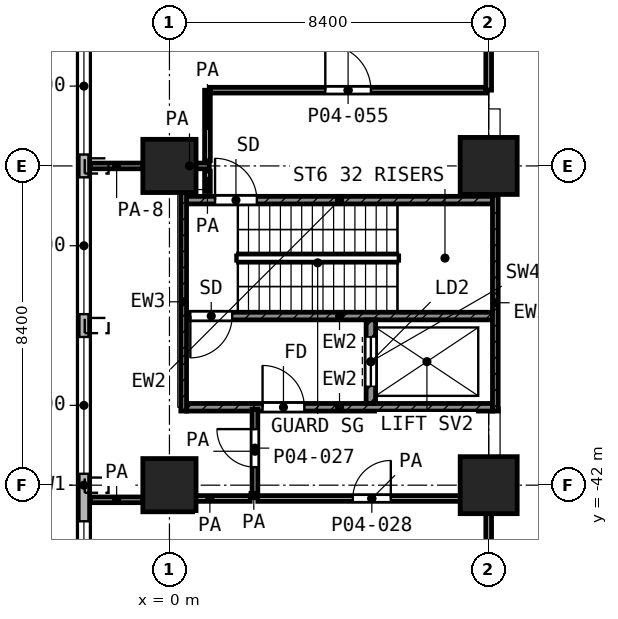
"""IFC4 building model, lengths in metres.
Left out: names, types, materials, properties, quantities, classifications, styles, units other than length and angle.
Written with IfcOpenShell. Run it as: python <this file> out.ifc"""

import sys

from ifc_helpers import new_model, si_unit, direction, frame, frame_2d, origin, origin_2d, place, context, subcontext, project, spatial, rectangle, extrude, element, fill, save


model = new_model("IFC4")
c1 = context("Model", 3, precision=1e-05, world=origin(), true_north=direction((0.0, 1.0)))
c2 = subcontext(c1, "Body", "Model", "MODEL_VIEW")
j1 = project(units=[si_unit("LENGTHUNIT", "METRE"), si_unit("PLANEANGLEUNIT", "RADIAN")], contexts=[c1])
p1 = place(None, origin())
s1 = spatial("IfcSite", under=j1, at=p1, CompositionType="ELEMENT")
p2 = place(p1, origin())
s2 = spatial("IfcBuilding", under=s1, at=p2, CompositionType="ELEMENT")
p3 = place(p2, frame((0.0, 0.0, 18.2)))
s3 = spatial("IfcBuildingStorey", under=s2, at=p3, CompositionType="ELEMENT", Elevation=18.2)
p4 = place(p3, frame((0.0, -33.6, 0.0), z_axis=(0.0, 0.0, 1.0), x_axis=(1.0, 0.0, 0.0)))
e1 = element("IfcColumn", 1, at=p4, inside=s3, PredefinedType="COLUMN", context=c2, shape_type="SweptSolid", body=[
    extrude(rectangle(XDim=1.4, YDim=1.4, at=origin_2d()), origin(), (0.0, 0.0, 1.0), 5.6),
])
p5 = place(p3, frame((8.4, -33.6, 0.0), z_axis=(0.0, 0.0, 1.0), x_axis=(1.0, 0.0, 0.0)))
e2 = element("IfcColumn", 2, at=p5, inside=s3, PredefinedType="COLUMN", context=c2, shape_type="SweptSolid", body=[
    extrude(rectangle(XDim=1.5, YDim=1.5, at=origin_2d()), origin(), (0.0, 0.0, 1.0), 5.6),
])
p6 = place(p3, frame((0.0, -42.0, 0.0), z_axis=(0.0, 0.0, 1.0), x_axis=(1.0, 0.0, 0.0)))
e3 = element("IfcColumn", 3, at=p6, inside=s3, PredefinedType="COLUMN", context=c2, shape_type="SweptSolid", body=[
    extrude(rectangle(XDim=1.4, YDim=1.4, at=origin_2d()), origin(), (0.0, 0.0, 1.0), 5.6),
])
p7 = place(p3, frame((8.4, -42.0, 0.0), z_axis=(0.0, 0.0, 1.0), x_axis=(1.0, 0.0, 0.0)))
e4 = element("IfcColumn", 4, at=p7, inside=s3, PredefinedType="COLUMN", context=c2, shape_type="SweptSolid", body=[
    extrude(rectangle(XDim=1.5, YDim=1.5, at=origin_2d()), origin(), (0.0, 0.0, 1.0), 5.6),
])
p8 = place(p3, frame((-2.25, -3.662, 0.0), z_axis=(0.0, 0.0, 1.0), x_axis=(0.0, -1.0, 0.0)))
e5 = element("IfcWall", 5, at=p8, inside=s3, PredefinedType="SOLIDWALL", context=c2, shape_type="SweptSolid", body=[
    extrude(rectangle(XDim=76.676, YDim=0.3, at=frame_2d((38.338, 0.0))), origin(), (0.0, 0.0, 1.0), 5.05),
])
p9 = place(p8, frame((0.838, 0.0, 0.9)))
e6 = element("IfcOpeningElement", 6, at=p9, cuts=e5, PredefinedType="OPENING", context=c2, shape_type="SweptSolid", body=[
    extrude(rectangle(XDim=3.6, YDim=3.0, at=frame_2d((1.8, 1.5))), frame((0.0, 0.16, 0.0), z_axis=(0.0, -1.0, 0.0), x_axis=(1.0, 0.0, 0.0)), (0.0, 0.0, 1.0), 0.32),
])
p10 = place(p8, frame((5.038, 0.0, 0.9)))
e7 = element("IfcOpeningElement", 7, at=p10, cuts=e5, PredefinedType="OPENING", context=c2, shape_type="SweptSolid", body=[
    extrude(rectangle(XDim=3.6, YDim=3.0, at=frame_2d((1.8, 1.5))), frame((0.0, 0.16, 0.0), z_axis=(0.0, -1.0, 0.0), x_axis=(1.0, 0.0, 0.0)), (0.0, 0.0, 1.0), 0.32),
])
p11 = place(p8, frame((9.238, 0.0, 0.9)))
e8 = element("IfcOpeningElement", 8, at=p11, cuts=e5, PredefinedType="OPENING", context=c2, shape_type="SweptSolid", body=[
    extrude(rectangle(XDim=3.6, YDim=3.0, at=frame_2d((1.8, 1.5))), frame((0.0, 0.16, 0.0), z_axis=(0.0, -1.0, 0.0), x_axis=(1.0, 0.0, 0.0)), (0.0, 0.0, 1.0), 0.32),
])
p12 = place(p8, frame((13.438, 0.0, 0.9)))
e9 = element("IfcOpeningElement", 9, at=p12, cuts=e5, PredefinedType="OPENING", context=c2, shape_type="SweptSolid", body=[
    extrude(rectangle(XDim=3.6, YDim=3.0, at=frame_2d((1.8, 1.5))), frame((0.0, 0.16, 0.0), z_axis=(0.0, -1.0, 0.0), x_axis=(1.0, 0.0, 0.0)), (0.0, 0.0, 1.0), 0.32),
])
p13 = place(p8, frame((17.638, 0.0, 0.9)))
e10 = element("IfcOpeningElement", 10, at=p13, cuts=e5, PredefinedType="OPENING", context=c2, shape_type="SweptSolid", body=[
    extrude(rectangle(XDim=3.6, YDim=3.0, at=frame_2d((1.8, 1.5))), frame((0.0, 0.16, 0.0), z_axis=(0.0, -1.0, 0.0), x_axis=(1.0, 0.0, 0.0)), (0.0, 0.0, 1.0), 0.32),
])
p14 = place(p8, frame((21.838, 0.0, 0.9)))
e11 = element("IfcOpeningElement", 11, at=p14, cuts=e5, PredefinedType="OPENING", context=c2, shape_type="SweptSolid", body=[
    extrude(rectangle(XDim=3.6, YDim=3.0, at=frame_2d((1.8, 1.5))), frame((0.0, 0.16, 0.0), z_axis=(0.0, -1.0, 0.0), x_axis=(1.0, 0.0, 0.0)), (0.0, 0.0, 1.0), 0.32),
])
p15 = place(p8, frame((26.038, 0.0, 0.9)))
e12 = element("IfcOpeningElement", 12, at=p15, cuts=e5, PredefinedType="OPENING", context=c2, shape_type="SweptSolid", body=[
    extrude(rectangle(XDim=3.6, YDim=3.0, at=frame_2d((1.8, 1.5))), frame((0.0, 0.16, 0.0), z_axis=(0.0, -1.0, 0.0), x_axis=(1.0, 0.0, 0.0)), (0.0, 0.0, 1.0), 0.32),
])
p16 = place(p8, frame((30.238, 0.0, 0.9)))
e13 = element("IfcOpeningElement", 13, at=p16, cuts=e5, PredefinedType="OPENING", context=c2, shape_type="SweptSolid", body=[
    extrude(rectangle(XDim=3.6, YDim=3.0, at=frame_2d((1.8, 1.5))), frame((0.0, 0.16, 0.0), z_axis=(0.0, -1.0, 0.0), x_axis=(1.0, 0.0, 0.0)), (0.0, 0.0, 1.0), 0.32),
])
p17 = place(p8, frame((34.438, 0.0, 0.9)))
e14 = element("IfcOpeningElement", 14, at=p17, cuts=e5, PredefinedType="OPENING", context=c2, shape_type="SweptSolid", body=[
    extrude(rectangle(XDim=3.6, YDim=3.0, at=frame_2d((1.8, 1.5))), frame((0.0, 0.16, 0.0), z_axis=(0.0, -1.0, 0.0), x_axis=(1.0, 0.0, 0.0)), (0.0, 0.0, 1.0), 0.32),
])
p18 = place(p8, frame((39.288, 0.0, 0.9)))
e15 = element("IfcOpeningElement", 15, at=p18, cuts=e5, PredefinedType="OPENING", context=c2, shape_type="SweptSolid", body=[
    extrude(rectangle(XDim=2.4, YDim=3.0, at=frame_2d((1.2, 1.5))), frame((0.0, 0.16, 0.0), z_axis=(0.0, -1.0, 0.0), x_axis=(1.0, 0.0, 0.0)), (0.0, 0.0, 1.0), 0.32),
])
p19 = place(p8, frame((42.838, 0.0, 0.9)))
e16 = element("IfcOpeningElement", 16, at=p19, cuts=e5, PredefinedType="OPENING", context=c2, shape_type="SweptSolid", body=[
    extrude(rectangle(XDim=3.6, YDim=3.0, at=frame_2d((1.8, 1.5))), frame((0.0, 0.16, 0.0), z_axis=(0.0, -1.0, 0.0), x_axis=(1.0, 0.0, 0.0)), (0.0, 0.0, 1.0), 0.32),
])
p20 = place(p8, frame((47.038, 0.0, 0.9)))
e17 = element("IfcOpeningElement", 17, at=p20, cuts=e5, PredefinedType="OPENING", context=c2, shape_type="SweptSolid", body=[
    extrude(rectangle(XDim=3.6, YDim=3.0, at=frame_2d((1.8, 1.5))), frame((0.0, 0.16, 0.0), z_axis=(0.0, -1.0, 0.0), x_axis=(1.0, 0.0, 0.0)), (0.0, 0.0, 1.0), 0.32),
])
p21 = place(p8, frame((51.238, 0.0, 0.9)))
e18 = element("IfcOpeningElement", 18, at=p21, cuts=e5, PredefinedType="OPENING", context=c2, shape_type="SweptSolid", body=[
    extrude(rectangle(XDim=3.6, YDim=3.0, at=frame_2d((1.8, 1.5))), frame((0.0, 0.16, 0.0), z_axis=(0.0, -1.0, 0.0), x_axis=(1.0, 0.0, 0.0)), (0.0, 0.0, 1.0), 0.32),
])
p22 = place(p8, frame((55.803, 0.0, 0.9)))
e19 = element("IfcOpeningElement", 19, at=p22, cuts=e5, PredefinedType="OPENING", context=c2, shape_type="SweptSolid", body=[
    extrude(rectangle(XDim=2.4, YDim=3.0, at=frame_2d((1.2, 1.5))), frame((0.0, 0.16, 0.0), z_axis=(0.0, -1.0, 0.0), x_axis=(1.0, 0.0, 0.0)), (0.0, 0.0, 1.0), 0.32),
])
p23 = place(p8, frame((59.638, 0.0, 0.9)))
e20 = element("IfcOpeningElement", 20, at=p23, cuts=e5, PredefinedType="OPENING", context=c2, shape_type="SweptSolid", body=[
    extrude(rectangle(XDim=3.6, YDim=3.0, at=frame_2d((1.8, 1.5))), frame((0.0, 0.16, 0.0), z_axis=(0.0, -1.0, 0.0), x_axis=(1.0, 0.0, 0.0)), (0.0, 0.0, 1.0), 0.32),
])
p24 = place(p8, frame((63.838, 0.0, 0.9)))
e21 = element("IfcOpeningElement", 21, at=p24, cuts=e5, PredefinedType="OPENING", context=c2, shape_type="SweptSolid", body=[
    extrude(rectangle(XDim=3.6, YDim=3.0, at=frame_2d((1.8, 1.5))), frame((0.0, 0.16, 0.0), z_axis=(0.0, -1.0, 0.0), x_axis=(1.0, 0.0, 0.0)), (0.0, 0.0, 1.0), 0.32),
])
p25 = place(p8, frame((68.438, 0.0, 0.9)))
e22 = element("IfcOpeningElement", 22, at=p25, cuts=e5, PredefinedType="OPENING", context=c2, shape_type="SweptSolid", body=[
    extrude(rectangle(XDim=1.2, YDim=3.0, at=frame_2d((0.6, 1.5))), frame((0.0, 0.16, 0.0), z_axis=(0.0, -1.0, 0.0), x_axis=(1.0, 0.0, 0.0)), (0.0, 0.0, 1.0), 0.32),
])
p26 = place(p8, frame((72.238, 0.0, 0.9)))
e23 = element("IfcOpeningElement", 23, at=p26, cuts=e5, PredefinedType="OPENING", context=c2, shape_type="SweptSolid", body=[
    extrude(rectangle(XDim=3.6, YDim=3.0, at=frame_2d((1.8, 1.5))), frame((0.0, 0.16, 0.0), z_axis=(0.0, -1.0, 0.0), x_axis=(1.0, 0.0, 0.0)), (0.0, 0.0, 1.0), 0.32),
])
p27 = place(p3, frame((0.375, -40.05, 0.0), z_axis=(0.0, 0.0, 1.0), x_axis=(0.0, 1.0, 0.0)))
e24 = element("IfcWall", 24, at=p27, inside=s3, PredefinedType="SHEAR", context=c2, shape_type="SweptSolid", body=[
    extrude(rectangle(XDim=5.75, YDim=0.15, at=frame_2d((2.875, 0.0))), origin(), (0.0, 0.0, 1.0), 5.05),
])
p28 = place(p3, frame((8.575, -40.05, 0.0), z_axis=(0.0, 0.0, 1.0), x_axis=(0.0, 1.0, 0.0)))
e25 = element("IfcWall", 25, at=p28, inside=s3, PredefinedType="SHEAR", context=c2, shape_type="SweptSolid", body=[
    extrude(rectangle(XDim=5.7, YDim=0.15, at=frame_2d((2.85, 0.0))), origin(), (0.0, 0.0, 1.0), 5.05),
])
p29 = place(p3, frame((0.45, -34.5, 0.0), z_axis=(0.0, 0.0, 1.0), x_axis=(1.0, 0.0, 0.0)))
e26 = element("IfcWall", 26, at=p29, inside=s3, PredefinedType="SHEAR", context=c2, shape_type="SweptSolid", body=[
    extrude(rectangle(XDim=8.05, YDim=0.2, at=frame_2d((4.025, 0.0))), origin(), (0.0, 0.0, 1.0), 5.05),
])
p30 = place(p29, frame((0.75, 0.0, 0.0)))
e27 = element("IfcOpeningElement", 27, at=p30, cuts=e26, PredefinedType="OPENING", context=c2, shape_type="SweptSolid", body=[
    extrude(rectangle(XDim=1.1, YDim=2.1, at=frame_2d((0.55, 1.05))), frame((0.0, 0.11, 0.0), z_axis=(0.0, -1.0, 0.0), x_axis=(1.0, 0.0, 0.0)), (0.0, 0.0, 1.0), 0.22),
])
p31 = place(p3, frame((0.45, -37.55, 0.0), z_axis=(0.0, 0.0, 1.0), x_axis=(1.0, 0.0, 0.0)))
e28 = element("IfcWall", 28, at=p31, inside=s3, PredefinedType="SHEAR", context=c2, shape_type="SweptSolid", body=[
    extrude(rectangle(XDim=8.05, YDim=0.2, at=frame_2d((4.025, 0.0))), origin(), (0.0, 0.0, 1.0), 5.05),
])
p32 = place(p31, frame((0.1, 0.0, 0.0)))
e29 = element("IfcOpeningElement", 29, at=p32, cuts=e28, PredefinedType="OPENING", context=c2, shape_type="SweptSolid", body=[
    extrude(rectangle(XDim=1.1, YDim=2.1, at=frame_2d((0.55, 1.05))), frame((0.0, 0.11, 0.0), z_axis=(0.0, -1.0, 0.0), x_axis=(1.0, 0.0, 0.0)), (0.0, 0.0, 1.0), 0.22),
])
p33 = place(p3, frame((0.45, -39.95, 0.0), z_axis=(0.0, 0.0, 1.0), x_axis=(1.0, 0.0, 0.0)))
e30 = element("IfcWall", 30, at=p33, inside=s3, PredefinedType="SHEAR", context=c2, shape_type="SweptSolid", body=[
    extrude(rectangle(XDim=8.05, YDim=0.2, at=frame_2d((4.025, 0.0))), origin(), (0.0, 0.0, 1.0), 5.05),
])
p34 = place(p33, frame((2.0, 0.0, 0.0)))
e31 = element("IfcOpeningElement", 31, at=p34, cuts=e30, PredefinedType="OPENING", context=c2, shape_type="SweptSolid", body=[
    extrude(rectangle(XDim=1.1, YDim=2.1, at=frame_2d((0.55, 1.05))), frame((0.0, 0.11, 0.0), z_axis=(0.0, -1.0, 0.0), x_axis=(1.0, 0.0, 0.0)), (0.0, 0.0, 1.0), 0.22),
])
p35 = place(p3, frame((5.3, -39.85, 0.0), z_axis=(0.0, 0.0, 1.0), x_axis=(0.0, 1.0, 0.0)))
e32 = element("IfcWall", 32, at=p35, inside=s3, PredefinedType="SHEAR", context=c2, shape_type="SweptSolid", body=[
    extrude(rectangle(XDim=2.2, YDim=0.25, at=frame_2d((1.1, 0.0))), origin(), (0.0, 0.0, 1.0), 5.05),
])
p36 = place(p35, frame((0.45, 0.0, 0.0)))
e33 = element("IfcOpeningElement", 33, at=p36, cuts=e32, PredefinedType="OPENING", context=c2, shape_type="SweptSolid", body=[
    extrude(rectangle(XDim=1.3, YDim=2.1, at=frame_2d((0.65, 1.05))), frame((0.0, 0.135, 0.0), z_axis=(0.0, -1.0, 0.0), x_axis=(1.0, 0.0, 0.0)), (0.0, 0.0, 1.0), 0.27),
])
p37 = place(p3, frame((-2.08, -42.385, 0.0), z_axis=(0.0, 0.0, 1.0), x_axis=(1.0, 0.0, 0.0)))
e34 = element("IfcWall", 34, at=p37, inside=s3, PredefinedType="PARTITIONING", context=c2, shape_type="SweptSolid", body=[
    extrude(rectangle(XDim=1.38, YDim=0.15, at=frame_2d((0.69, 0.0))), origin(), (0.0, 0.0, 1.0), 5.05),
])
p38 = place(p3, frame((0.003, -42.35, 0.0), z_axis=(0.0, 0.0, 1.0), x_axis=(1.0, 0.0, 0.0)))
e35 = element("IfcWall", 35, at=p38, inside=s3, PredefinedType="PARTITIONING", context=c2, shape_type="SweptSolid", body=[
    extrude(rectangle(XDim=2.122, YDim=0.15, at=frame_2d((1.061, 0.0))), origin(), (0.0, 0.0, 1.0), 5.05),
])
p39 = place(p3, frame((2.325, -42.35, 0.0), z_axis=(0.0, 0.0, 1.0), x_axis=(1.0, 0.0, 0.0)))
e36 = element("IfcWall", 36, at=p39, inside=s3, PredefinedType="PARTITIONING", context=c2, shape_type="SweptSolid", body=[
    extrude(rectangle(XDim=6.0, YDim=0.15, at=frame_2d((3.0, 0.0))), origin(), (0.0, 0.0, 1.0), 5.05),
])
p40 = place(p39, frame((2.5, 0.0, 0.0)))
e37 = element("IfcOpeningElement", 37, at=p40, cuts=e36, PredefinedType="OPENING", context=c2, shape_type="SweptSolid", body=[
    extrude(rectangle(XDim=1.0, YDim=2.1, at=frame_2d((0.5, 1.05))), frame((0.0, 0.085, 0.0), z_axis=(0.0, -1.0, 0.0), x_axis=(1.0, 0.0, 0.0)), (0.0, 0.0, 1.0), 0.17),
])
p41 = place(p3, frame((-2.08, -33.6, 0.0), z_axis=(0.0, 0.0, 1.0), x_axis=(1.0, 0.0, 0.0)))
e38 = element("IfcWall", 38, at=p41, inside=s3, PredefinedType="PARTITIONING", context=c2, shape_type="SweptSolid", body=[
    extrude(rectangle(XDim=1.38, YDim=0.15, at=frame_2d((0.69, 0.0))), origin(), (0.0, 0.0, 1.0), 4.15),
])
p42 = place(p3, frame((0.006, -33.6, 0.0), z_axis=(0.0, 0.0, 1.0), x_axis=(1.0, 0.0, 0.0)))
e39 = element("IfcWall", 39, at=p42, inside=s3, PredefinedType="PARTITIONING", context=c2, shape_type="SweptSolid", body=[
    extrude(rectangle(XDim=1.043, YDim=0.15, at=frame_2d((0.521, 0.0))), origin(), (0.0, 0.0, 1.0), 5.05),
])
p43 = place(p3, frame((1.077, -31.607, 0.0), z_axis=(0.0, 0.0, 1.0), x_axis=(1.0, 0.0, 0.0)))
e40 = element("IfcWall", 40, at=p43, inside=s3, PredefinedType="PARTITIONING", context=c2, shape_type="SweptSolid", body=[
    extrude(rectangle(XDim=7.248, YDim=0.15, at=frame_2d((3.624, 0.0))), origin(), (0.0, 0.0, 1.0), 5.05),
])
p44 = place(p43, frame((3.024, 0.0, 0.0)))
e41 = element("IfcOpeningElement", 41, at=p44, cuts=e40, PredefinedType="OPENING", context=c2, shape_type="SweptSolid", body=[
    extrude(rectangle(XDim=1.2, YDim=2.1, at=frame_2d((0.6, 1.05))), frame((0.0, 0.085, 0.0), z_axis=(0.0, -1.0, 0.0), x_axis=(1.0, 0.0, 0.0)), (0.0, 0.0, 1.0), 0.17),
])
p45 = place(p3, frame((1.0, -34.273, 0.0), z_axis=(0.0, 0.0, 1.0), x_axis=(0.0, 1.0, 0.0)))
e42 = element("IfcWall", 42, at=p45, inside=s3, PredefinedType="PARTITIONING", context=c2, shape_type="SweptSolid", body=[
    extrude(rectangle(XDim=0.538, YDim=0.15, at=frame_2d((0.269, 0.0))), origin(), (0.0, 0.0, 1.0), 5.05),
])
p46 = place(p3, frame((1.0, -33.465, 0.0), z_axis=(0.0, 0.0, 1.0), x_axis=(0.0, 1.0, 0.0)))
e43 = element("IfcWall", 43, at=p46, inside=s3, PredefinedType="PARTITIONING", context=c2, shape_type="SweptSolid", body=[
    extrude(rectangle(XDim=1.856, YDim=0.15, at=frame_2d((0.928, 0.0))), origin(), (0.0, 0.0, 1.0), 5.05),
])
p47 = place(p3, frame((2.22, -42.33, 0.0), z_axis=(0.0, 0.0, 1.0), x_axis=(0.0, 1.0, 0.0)))
e44 = element("IfcWall", 44, at=p47, inside=s3, PredefinedType="PARTITIONING", context=c2, shape_type="SweptSolid", body=[
    extrude(rectangle(XDim=0.115, YDim=0.15, at=frame_2d((0.058, 0.0))), origin(), (0.0, 0.0, 1.0), 5.05),
])
p48 = place(p3, frame((2.25, -42.215, 0.0), z_axis=(0.0, 0.0, 1.0), x_axis=(0.0, 1.0, 0.0)))
e45 = element("IfcWall", 45, at=p48, inside=s3, PredefinedType="PARTITIONING", context=c2, shape_type="SweptSolid", body=[
    extrude(rectangle(XDim=2.215, YDim=0.15, at=frame_2d((1.107, 0.0))), origin(), (0.0, 0.0, 1.0), 5.05),
])
p49 = place(p48, frame((0.69, 0.0, 0.0)))
e46 = element("IfcOpeningElement", 46, at=p49, cuts=e45, PredefinedType="OPENING", context=c2, shape_type="SweptSolid", body=[
    extrude(rectangle(XDim=1.0, YDim=2.1, at=frame_2d((0.5, 1.05))), frame((0.0, 0.085, 0.0), z_axis=(0.0, -1.0, 0.0), x_axis=(1.0, 0.0, 0.0)), (0.0, 0.0, 1.0), 0.17),
])
p50 = place(p3, frame((8.4, -67.947, 0.0), z_axis=(0.0, 0.0, 1.0), x_axis=(0.0, 1.0, 0.0)))
e47 = element("IfcWall", 47, at=p50, inside=s3, PredefinedType="PARTITIONING", context=c2, shape_type="SweptSolid", body=[
    extrude(rectangle(XDim=25.597, YDim=0.15, at=frame_2d((12.798, 0.0))), origin(), (0.0, 0.0, 1.0), 5.05),
])
p51 = place(p50, frame((18.347, 0.0, 0.0)))
e48 = element("IfcOpeningElement", 48, at=p51, cuts=e47, PredefinedType="OPENING", context=c2, shape_type="SweptSolid", body=[
    extrude(rectangle(XDim=1.2, YDim=2.1, at=frame_2d((0.6, 1.05))), frame((0.0, 0.085, 0.0), z_axis=(0.0, -1.0, 0.0), x_axis=(1.0, 0.0, 0.0)), (0.0, 0.0, 1.0), 0.17),
])
p52 = place(p50, frame((7.147, 0.0, 0.0)))
e49 = element("IfcOpeningElement", 49, at=p52, cuts=e47, PredefinedType="OPENING", context=c2, shape_type="SweptSolid", body=[
    extrude(rectangle(XDim=1.2, YDim=2.1, at=frame_2d((0.6, 1.05))), frame((0.0, 0.085, 0.0), z_axis=(0.0, -1.0, 0.0), x_axis=(1.0, 0.0, 0.0)), (0.0, 0.0, 1.0), 0.17),
])
p53 = place(p50, frame((9.947, 0.0, 0.0)))
e50 = element("IfcOpeningElement", 50, at=p53, cuts=e47, PredefinedType="OPENING", context=c2, shape_type="SweptSolid", body=[
    extrude(rectangle(XDim=1.2, YDim=2.1, at=frame_2d((0.6, 1.05))), frame((0.0, 0.085, 0.0), z_axis=(0.0, -1.0, 0.0), x_axis=(1.0, 0.0, 0.0)), (0.0, 0.0, 1.0), 0.17),
])
p54 = place(p50, frame((1.549, 0.0, 0.0)))
e51 = element("IfcOpeningElement", 51, at=p54, cuts=e47, PredefinedType="OPENING", context=c2, shape_type="SweptSolid", body=[
    extrude(rectangle(XDim=1.2, YDim=2.1, at=frame_2d((0.6, 1.05))), frame((0.0, 0.085, 0.0), z_axis=(0.0, -1.0, 0.0), x_axis=(1.0, 0.0, 0.0)), (0.0, 0.0, 1.0), 0.17),
])
p55 = place(p3, frame((8.4, -31.607, 0.0), z_axis=(0.0, 0.0, 1.0), x_axis=(0.0, 1.0, 0.0)))
e52 = element("IfcWall", 52, at=p55, inside=s3, PredefinedType="PARTITIONING", context=c2, shape_type="SweptSolid", body=[
    extrude(rectangle(XDim=6.407, YDim=0.15, at=frame_2d((3.204, 0.0))), origin(), (0.0, 0.0, 1.0), 5.05),
])
p56 = place(p15, origin())
e53 = element("IfcWindow", 53, at=p56, inside=s3, PartitioningType="SINGLE_PANEL", PredefinedType="WINDOW", context=c2, shape_type="SweptSolid", body=[
    extrude(rectangle(XDim=3.6, YDim=3.0, at=frame_2d((1.8, 1.5))), frame((0.0, 0.03, 0.0), z_axis=(0.0, -1.0, 0.0), x_axis=(1.0, 0.0, 0.0)), (0.0, 0.0, 1.0), 0.06),
])
fill(e12, e53)
p57 = place(p16, origin())
e54 = element("IfcWindow", 54, at=p57, inside=s3, PartitioningType="SINGLE_PANEL", PredefinedType="WINDOW", context=c2, shape_type="SweptSolid", body=[
    extrude(rectangle(XDim=3.6, YDim=3.0, at=frame_2d((1.8, 1.5))), frame((0.0, 0.03, 0.0), z_axis=(0.0, -1.0, 0.0), x_axis=(1.0, 0.0, 0.0)), (0.0, 0.0, 1.0), 0.06),
])
fill(e13, e54)
p58 = place(p17, origin())
e55 = element("IfcWindow", 55, at=p58, inside=s3, PartitioningType="SINGLE_PANEL", PredefinedType="WINDOW", context=c2, shape_type="SweptSolid", body=[
    extrude(rectangle(XDim=3.6, YDim=3.0, at=frame_2d((1.8, 1.5))), frame((0.0, 0.03, 0.0), z_axis=(0.0, -1.0, 0.0), x_axis=(1.0, 0.0, 0.0)), (0.0, 0.0, 1.0), 0.06),
])
fill(e14, e55)
p59 = place(p18, origin())
e56 = element("IfcWindow", 56, at=p59, inside=s3, PartitioningType="SINGLE_PANEL", PredefinedType="WINDOW", context=c2, shape_type="SweptSolid", body=[
    extrude(rectangle(XDim=2.4, YDim=3.0, at=frame_2d((1.2, 1.5))), frame((0.0, 0.03, 0.0), z_axis=(0.0, -1.0, 0.0), x_axis=(1.0, 0.0, 0.0)), (0.0, 0.0, 1.0), 0.06),
])
fill(e15, e56)
p60 = place(p30, origin())
e57 = element("IfcDoor", 57, at=p60, inside=s3, OperationType="SINGLE_SWING_LEFT", PredefinedType="DOOR", context=c2, shape_type="SweptSolid", body=[
    extrude(rectangle(XDim=1.1, YDim=2.1, at=frame_2d((0.55, 1.05))), frame((0.0, 0.025, 0.0), z_axis=(0.0, -1.0, 0.0), x_axis=(1.0, 0.0, 0.0)), (0.0, 0.0, 1.0), 0.05),
])
fill(e27, e57)
p61 = place(p32, frame((1.1, 0.0, 0.0), z_axis=(0.0, 0.0, 1.0), x_axis=(-1.0, 0.0, 0.0)))
e58 = element("IfcDoor", 58, at=p61, inside=s3, OperationType="SINGLE_SWING_LEFT", PredefinedType="DOOR", context=c2, shape_type="SweptSolid", body=[
    extrude(rectangle(XDim=1.1, YDim=2.1, at=frame_2d((0.55, 1.05))), frame((0.0, 0.025, 0.0), z_axis=(0.0, -1.0, 0.0), x_axis=(1.0, 0.0, 0.0)), (0.0, 0.0, 1.0), 0.05),
])
fill(e29, e58)
p62 = place(p36, origin())
e59 = element("IfcDoor", 59, at=p62, inside=s3, OperationType="DOUBLE_DOOR_SLIDING", PredefinedType="DOOR", context=c2, shape_type="SweptSolid", body=[
    extrude(rectangle(XDim=1.3, YDim=2.1, at=frame_2d((0.65, 1.05))), frame((0.0, 0.025, 0.0), z_axis=(0.0, -1.0, 0.0), x_axis=(1.0, 0.0, 0.0)), (0.0, 0.0, 1.0), 0.05),
])
fill(e33, e59)
p63 = place(p34, origin())
e60 = element("IfcDoor", 60, at=p63, inside=s3, OperationType="SINGLE_SWING_LEFT", PredefinedType="DOOR", context=c2, shape_type="SweptSolid", body=[
    extrude(rectangle(XDim=1.1, YDim=2.1, at=frame_2d((0.55, 1.05))), frame((0.0, 0.025, 0.0), z_axis=(0.0, -1.0, 0.0), x_axis=(1.0, 0.0, 0.0)), (0.0, 0.0, 1.0), 0.05),
])
fill(e31, e60)
p64 = place(p44, origin())
e61 = element("IfcDoor", 61, at=p64, inside=s3, OperationType="SINGLE_SWING_LEFT", PredefinedType="DOOR", context=c2, shape_type="SweptSolid", body=[
    extrude(rectangle(XDim=1.2, YDim=2.1, at=frame_2d((0.6, 1.05))), frame((0.0, 0.025, 0.0), z_axis=(0.0, -1.0, 0.0), x_axis=(1.0, 0.0, 0.0)), (0.0, 0.0, 1.0), 0.05),
])
fill(e41, e61)
p65 = place(p49, origin())
e62 = element("IfcDoor", 62, at=p65, inside=s3, OperationType="SINGLE_SWING_RIGHT", PredefinedType="DOOR", context=c2, shape_type="SweptSolid", body=[
    extrude(rectangle(XDim=1.0, YDim=2.1, at=frame_2d((0.5, 1.05))), frame((0.0, 0.025, 0.0), z_axis=(0.0, -1.0, 0.0), x_axis=(1.0, 0.0, 0.0)), (0.0, 0.0, 1.0), 0.05),
])
fill(e46, e62)
p66 = place(p40, origin())
e63 = element("IfcDoor", 63, at=p66, inside=s3, OperationType="SINGLE_SWING_RIGHT", PredefinedType="DOOR", context=c2, shape_type="SweptSolid", body=[
    extrude(rectangle(XDim=1.0, YDim=2.1, at=frame_2d((0.5, 1.05))), frame((0.0, 0.025, 0.0), z_axis=(0.0, -1.0, 0.0), x_axis=(1.0, 0.0, 0.0)), (0.0, 0.0, 1.0), 0.05),
])
fill(e37, e63)
save(model, sys.argv[1])
